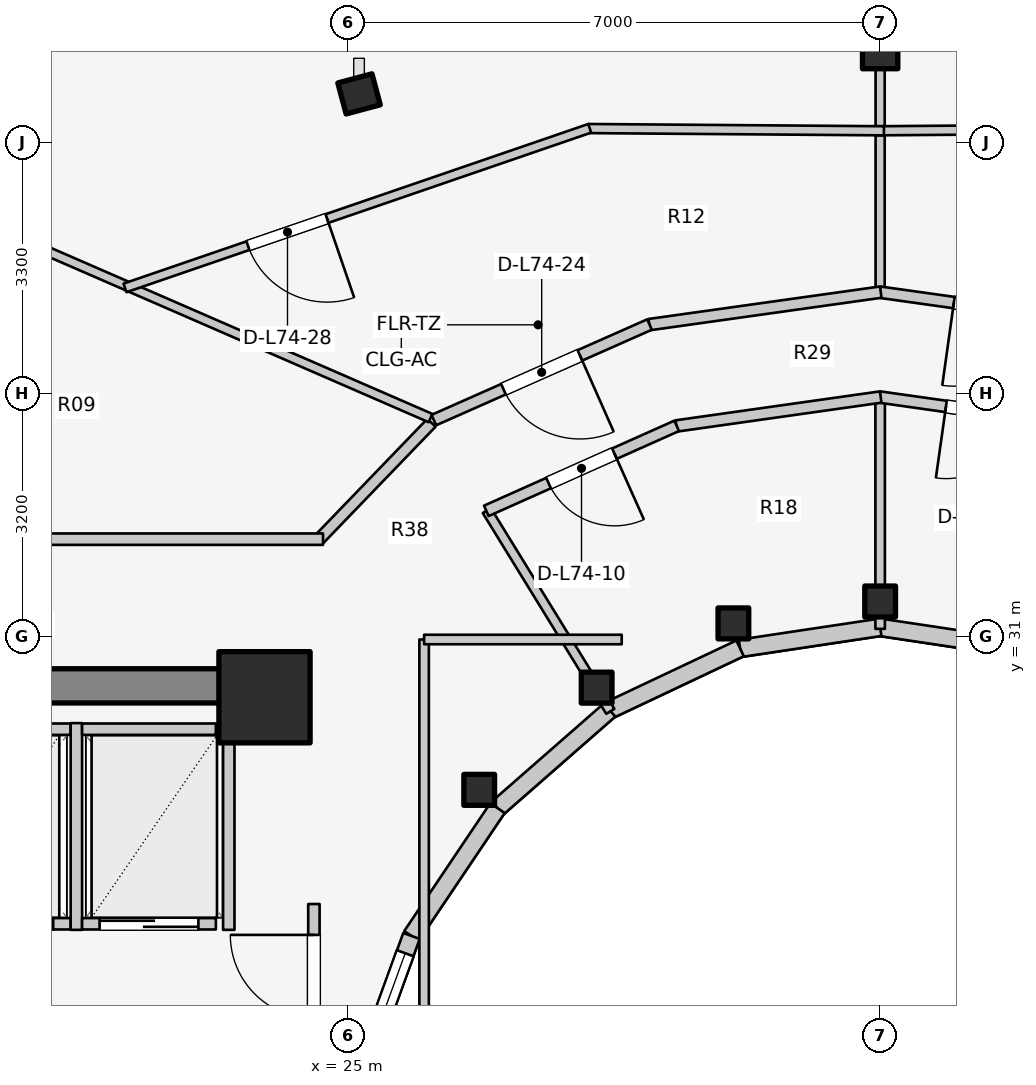
"""IFC4 building model, lengths in metres.
Left out: names, types, materials, properties, quantities, classifications, styles, units other than length and angle.
Written with IfcOpenShell. Run it as: python <this file> out.ifc"""

import sys

from ifc_helpers import new_model, si_unit, direction, frame, frame_2d, origin, origin_2d, place, context, subcontext, project, spatial, rectangle, i_section, extrude, element, fill, save


model = new_model("IFC4")
c1 = context("Model", 3, precision=1e-05, world=origin(), true_north=direction((0.0, 1.0)))
c2 = subcontext(c1, "Body", "Model", "MODEL_VIEW")
j1 = project(units=[si_unit("LENGTHUNIT", "METRE"), si_unit("PLANEANGLEUNIT", "RADIAN")], contexts=[c1])
p1 = place(None, origin())
s1 = spatial("IfcSite", under=j1, at=p1, CompositionType="ELEMENT")
p2 = place(p1, origin())
s2 = spatial("IfcBuilding", under=s1, at=p2, CompositionType="ELEMENT")
p3 = place(p2, frame((0.0, 0.0, 242.4)))
s3 = spatial("IfcBuildingStorey", under=s2, at=p3, CompositionType="ELEMENT", Elevation=242.4)
p4 = place(p3, frame((19.65, 30.35, 0.0), z_axis=(0.0, 0.0, 1.0), x_axis=(1.0, 0.0, 0.0)))
e1 = element("IfcWall", 1, at=p4, inside=s3, PredefinedType="SHEAR", context=c2, shape_type="SweptSolid", body=[
    extrude(rectangle(XDim=4.5, YDim=0.45, at=frame_2d((2.25, 0.0))), origin(), (0.0, 0.0, 1.0), 3.6),
])
p5 = place(p3, frame((23.9, 30.2, 0.0), z_axis=(0.0, 0.0, 1.0), x_axis=(1.0, 0.0, 0.0)))
e2 = element("IfcColumn", 2, at=p5, inside=s3, PredefinedType="COLUMN", context=c2, shape_type="SweptSolid", body=[
    extrude(rectangle(XDim=1.2, YDim=1.2, at=origin_2d()), origin(), (0.0, 0.0, 1.0), 3.6),
])
p6 = place(p3, frame((32.0, 31.46, 0.0), z_axis=(0.0, 0.0, 1.0), x_axis=(1.0, 0.0, 0.0)))
e3 = element("IfcColumn", 3, at=p6, inside=s3, PredefinedType="COLUMN", context=c2, shape_type="SweptSolid", body=[
    extrude(i_section(OverallWidth=0.404, OverallDepth=0.407, WebThickness=0.027, FlangeThickness=0.044, FilletRadius=0.025, at=origin_2d()), origin(), (0.0, 0.0, 1.0), 3.6),
])
p7 = place(p3, frame((32.0, 38.68, 0.0), z_axis=(0.0, 0.0, 1.0), x_axis=(0.0, 1.0, 0.0)))
e4 = element("IfcColumn", 4, at=p7, inside=s3, PredefinedType="COLUMN", context=c2, shape_type="SweptSolid", body=[
    extrude(i_section(OverallWidth=0.422, OverallDepth=0.465, WebThickness=0.045, FlangeThickness=0.073, FilletRadius=0.025, at=origin_2d()), origin(), (0.0, 0.0, 1.0), 3.6),
])
p8 = place(p3, frame((30.069, 31.172, 0.0), z_axis=(0.0, 0.0, 1.0), x_axis=(1.0, 0.0, 0.0)))
e5 = element("IfcColumn", 5, at=p8, inside=s3, PredefinedType="COLUMN", context=c2, shape_type="SweptSolid", body=[
    extrude(i_section(OverallWidth=0.404, OverallDepth=0.407, WebThickness=0.027, FlangeThickness=0.044, FilletRadius=0.025, at=origin_2d()), origin(), (0.0, 0.0, 1.0), 3.6),
])
p9 = place(p3, frame((25.144, 38.138, 0.0), z_axis=(0.0, 0.0, 1.0), x_axis=(-0.258819045103, 0.965925826289, 0.0)))
e6 = element("IfcColumn", 6, at=p9, inside=s3, PredefinedType="COLUMN", context=c2, shape_type="SweptSolid", body=[
    extrude(i_section(OverallWidth=0.422, OverallDepth=0.465, WebThickness=0.045, FlangeThickness=0.073, FilletRadius=0.025, at=origin_2d()), origin(), (0.0, 0.0, 1.0), 3.6),
])
for number, where, z_axis, x_axis in (
    (7, (28.27, 30.327, 0.0), (0.0, 0.0, 1.0), (1.0, 0.0, 0.0)),
    (8, (26.725, 28.982, 0.0), (0.0, 0.0, 1.0), (1.0, 0.0, 0.0)),
):
    element("IfcColumn", number, at=place(p3, frame(where, z_axis=z_axis, x_axis=x_axis)), inside=s3, PredefinedType="COLUMN", context=c2, shape_type="SweptSolid", body=[
        extrude(i_section(OverallWidth=0.404, OverallDepth=0.407, WebThickness=0.027, FlangeThickness=0.044, FilletRadius=0.025, at=origin_2d()), origin(), (0.0, 0.0, 1.0), 3.6),
    ])
for number, where, z_axis, x_axis in (
    (9, (33.843, 30.843, 0.0), (0.0, 0.0, 1.0), (-0.989, 0.149, 0.0)),
    (10, (32.0, 31.12, 0.0), (0.0, 0.0, 1.0), (-0.989, -0.149, 0.0)),
):
    element("IfcWall", number, at=place(p3, frame(where, z_axis=z_axis, x_axis=x_axis)), inside=s3, PredefinedType="STANDARD", context=c2, shape_type="SweptSolid", body=[
        extrude(rectangle(XDim=1.864, YDim=0.23, at=frame_2d((0.932, 0.0))), origin(), (0.0, 0.0, 1.0), 2.6),
    ])
p10 = place(p3, frame((30.157, 30.843, 0.0), z_axis=(0.0, 0.0, 1.0), x_axis=(-0.904179699603, -0.427152280606, 0.0)))
e11 = element("IfcWall", 11, at=p10, inside=s3, PredefinedType="STANDARD", context=c2, shape_type="SweptSolid", body=[
    extrude(rectangle(XDim=1.899, YDim=0.23, at=frame_2d((0.95, 0.0))), origin(), (0.0, 0.0, 1.0), 2.6),
])
p11 = place(p3, frame((28.44, 30.032, 0.0), z_axis=(0.0, 0.0, 1.0), x_axis=(-0.752576694707, -0.658504607869, 0.0)))
e12 = element("IfcWall", 12, at=p11, inside=s3, PredefinedType="STANDARD", context=c2, shape_type="SweptSolid", body=[
    extrude(rectangle(XDim=1.959, YDim=0.23, at=frame_2d((0.98, 0.0))), origin(), (0.0, 0.0, 1.0), 2.6),
])
p12 = place(p3, frame((26.965, 28.742, 0.0), z_axis=(0.0, 0.0, 1.0), x_axis=(-0.558197800898, -0.829707909492, 0.0)))
e13 = element("IfcWall", 13, at=p12, inside=s3, PredefinedType="STANDARD", context=c2, shape_type="SweptSolid", body=[
    extrude(rectangle(XDim=2.027, YDim=0.23, at=frame_2d((1.013, 0.0))), origin(), (0.0, 0.0, 1.0), 2.6),
])
p13 = place(p3, frame((25.834, 27.06, 0.0), z_axis=(0.0, 0.0, 1.0), x_axis=(-0.341423187295, -0.93990968033, 0.0)))
e14 = element("IfcWall", 14, at=p13, inside=s3, PredefinedType="STANDARD", context=c2, shape_type="SweptSolid", body=[
    extrude(rectangle(XDim=2.084, YDim=0.23, at=frame_2d((1.042, 0.0))), origin(), (0.0, 0.0, 1.0), 3.28),
])
p14 = place(p13, frame((0.242, 0.0, 0.85)))
e15 = element("IfcOpeningElement", 15, at=p14, cuts=e14, PredefinedType="OPENING", context=c2, shape_type="SweptSolid", body=[
    extrude(rectangle(XDim=1.6, YDim=1.65, at=frame_2d((0.8, 0.825))), frame((0.0, 0.125, 0.0), z_axis=(0.0, -1.0, 0.0), x_axis=(1.0, 0.0, 0.0)), (0.0, 0.0, 1.0), 0.25),
])
p15 = place(p3, frame((19.59, 27.22, 0.0), z_axis=(0.0, 0.0, 1.0), x_axis=(1.0, 0.0, 0.0)))
e16 = element("IfcWall", 16, at=p15, inside=s3, PredefinedType="SOLIDWALL", context=c2, shape_type="SweptSolid", body=[
    extrude(rectangle(XDim=1.76, YDim=0.15, at=frame_2d((0.88, 0.0))), origin(), (0.0, 0.0, 1.0), 3.295),
])
p16 = place(p15, frame((0.23, 0.0, 0.0)))
e17 = element("IfcOpeningElement", 17, at=p16, cuts=e16, PredefinedType="OPENING", context=c2, shape_type="SweptSolid", body=[
    extrude(rectangle(XDim=1.3, YDim=2.1, at=frame_2d((0.65, 1.05))), frame((0.0, 0.085, 0.0), z_axis=(0.0, -1.0, 0.0), x_axis=(1.0, 0.0, 0.0)), (0.0, 0.0, 1.0), 0.17),
])
p17 = place(p3, frame((19.59, 29.78, 0.0), z_axis=(0.0, 0.0, 1.0), x_axis=(1.0, 0.0, 0.0)))
e18 = element("IfcWall", 18, at=p17, inside=s3, PredefinedType="SOLIDWALL", context=c2, shape_type="SweptSolid", body=[
    extrude(rectangle(XDim=1.76, YDim=0.15, at=frame_2d((0.88, 0.0))), origin(), (0.0, 0.0, 1.0), 3.295),
])
p18 = place(p3, frame((21.425, 27.14, 0.0), z_axis=(0.0, 0.0, 1.0), x_axis=(0.0, 1.0, 0.0)))
e19 = element("IfcWall", 19, at=p18, inside=s3, PredefinedType="SOLIDWALL", context=c2, shape_type="SweptSolid", body=[
    extrude(rectangle(XDim=2.72, YDim=0.15, at=frame_2d((1.36, 0.0))), origin(), (0.0, 0.0, 1.0), 3.295),
])
p19 = place(p3, frame((21.5, 27.22, 0.0), z_axis=(0.0, 0.0, 1.0), x_axis=(1.0, 0.0, 0.0)))
e20 = element("IfcWall", 20, at=p19, inside=s3, PredefinedType="SOLIDWALL", context=c2, shape_type="SweptSolid", body=[
    extrude(rectangle(XDim=1.76, YDim=0.15, at=frame_2d((0.88, 0.0))), origin(), (0.0, 0.0, 1.0), 3.295),
])
p20 = place(p19, frame((0.23, 0.0, 0.0)))
e21 = element("IfcOpeningElement", 21, at=p20, cuts=e20, PredefinedType="OPENING", context=c2, shape_type="SweptSolid", body=[
    extrude(rectangle(XDim=1.3, YDim=2.1, at=frame_2d((0.65, 1.05))), frame((0.0, 0.085, 0.0), z_axis=(0.0, -1.0, 0.0), x_axis=(1.0, 0.0, 0.0)), (0.0, 0.0, 1.0), 0.17),
])
p21 = place(p3, frame((21.5, 29.78, 0.0), z_axis=(0.0, 0.0, 1.0), x_axis=(1.0, 0.0, 0.0)))
e22 = element("IfcWall", 22, at=p21, inside=s3, PredefinedType="SOLIDWALL", context=c2, shape_type="SweptSolid", body=[
    extrude(rectangle(XDim=1.76, YDim=0.15, at=frame_2d((0.88, 0.0))), origin(), (0.0, 0.0, 1.0), 3.295),
])
p22 = place(p3, frame((23.43, 27.14, 0.0), z_axis=(0.0, 0.0, 1.0), x_axis=(0.0, 1.0, 0.0)))
e23 = element("IfcWall", 23, at=p22, inside=s3, PredefinedType="SOLIDWALL", context=c2, shape_type="SweptSolid", body=[
    extrude(rectangle(XDim=2.72, YDim=0.15, at=frame_2d((1.36, 0.0))), origin(), (0.0, 0.0, 1.0), 3.295),
])
p23 = place(p3, frame((24.55, 24.08, 0.0), z_axis=(0.0, 0.0, 1.0), x_axis=(0.0, 1.0, 0.0)))
e24 = element("IfcWall", 24, at=p23, inside=s3, PredefinedType="PARTITIONING", context=c2, shape_type="SweptSolid", body=[
    extrude(rectangle(XDim=3.4, YDim=0.15, at=frame_2d((1.7, 0.0))), origin(), (0.0, 0.0, 1.0), 3.295),
])
p24 = place(p23, frame((1.894, 0.0, 0.0)))
e25 = element("IfcOpeningElement", 25, at=p24, cuts=e24, PredefinedType="OPENING", context=c2, shape_type="SweptSolid", body=[
    extrude(rectangle(XDim=1.1, YDim=2.1, at=frame_2d((0.55, 1.05))), frame((0.0, 0.085, 0.0), z_axis=(0.0, -1.0, 0.0), x_axis=(1.0, 0.0, 0.0)), (0.0, 0.0, 1.0), 0.17),
])
p25 = place(p3, frame((32.0, 31.1, 0.0), z_axis=(0.0, 0.0, 1.0), x_axis=(0.0, 1.0, 0.0)))
e26 = element("IfcWall", 26, at=p25, inside=s3, PredefinedType="PARTITIONING", context=c2, shape_type="SweptSolid", body=[
    extrude(rectangle(XDim=3.05, YDim=0.125, at=frame_2d((1.525, 0.0))), origin(), (0.0, 0.0, 1.0), 2.672),
])
p26 = place(p3, frame((28.45, 30.015, 0.0), z_axis=(0.0, 0.0, 1.0), x_axis=(-0.523992004803, 0.851723182086, 0.0)))
e27 = element("IfcWall", 27, at=p26, inside=s3, PredefinedType="PARTITIONING", context=c2, shape_type="SweptSolid", body=[
    extrude(rectangle(XDim=3.101, YDim=0.125, at=frame_2d((1.551, 0.0))), origin(), (0.0, 0.0, 1.0), 2.672),
])
p27 = place(p3, frame((34.68, 33.77, 0.0), z_axis=(0.0, 0.0, 1.0), x_axis=(-0.990132151456, 0.140136799779, 0.0)))
e28 = element("IfcWall", 28, at=p27, inside=s3, PredefinedType="PARTITIONING", context=c2, shape_type="SweptSolid", body=[
    extrude(rectangle(XDim=2.714, YDim=0.15, at=frame_2d((1.357, 0.0))), origin(), (0.0, 0.0, 1.0), 2.823),
])
p28 = place(p27, frame((0.882, 0.0, 0.0)))
e29 = element("IfcOpeningElement", 29, at=p28, cuts=e28, PredefinedType="OPENING", context=c2, shape_type="SweptSolid", body=[
    extrude(rectangle(XDim=0.95, YDim=2.1, at=frame_2d((0.475, 1.05))), frame((0.0, 0.085, 0.0), z_axis=(0.0, -1.0, 0.0), x_axis=(1.0, 0.0, 0.0)), (0.0, 0.0, 1.0), 0.17),
])
p29 = place(p3, frame((32.007, 34.15, 0.0), z_axis=(0.0, 0.0, 1.0), x_axis=(-0.990132151456, -0.140136799779, 0.0)))
e30 = element("IfcWall", 30, at=p29, inside=s3, PredefinedType="PARTITIONING", context=c2, shape_type="SweptSolid", body=[
    extrude(rectangle(XDim=2.714, YDim=0.15, at=frame_2d((1.357, 0.0))), origin(), (0.0, 0.0, 1.0), 2.823),
])
p30 = place(p3, frame((29.323, 33.771, 0.0), z_axis=(0.0, 0.0, 1.0), x_axis=(-0.913120130558, -0.407690602257, 0.0)))
e31 = element("IfcWall", 31, at=p30, inside=s3, PredefinedType="PARTITIONING", context=c2, shape_type="SweptSolid", body=[
    extrude(rectangle(XDim=2.743, YDim=0.15, at=frame_2d((1.371, 0.0))), origin(), (0.0, 0.0, 1.0), 2.823),
])
p31 = place(p30, frame((0.896, 0.0, 0.0)))
e32 = element("IfcOpeningElement", 32, at=p31, cuts=e31, PredefinedType="OPENING", context=c2, shape_type="SweptSolid", body=[
    extrude(rectangle(XDim=0.95, YDim=2.1, at=frame_2d((0.475, 1.05))), frame((0.0, 0.085, 0.0), z_axis=(0.0, -1.0, 0.0), x_axis=(1.0, 0.0, 0.0)), (0.0, 0.0, 1.0), 0.17),
])
p32 = place(p3, frame((26.0, 25.8, 0.0), z_axis=(0.0, 0.0, 1.0), x_axis=(0.0, 1.0, 0.0)))
e33 = element("IfcWall", 33, at=p32, inside=s3, PredefinedType="PARTITIONING", context=c2, shape_type="SweptSolid", body=[
    extrude(rectangle(XDim=5.16, YDim=0.125, at=frame_2d((2.58, 0.0))), origin(), (0.0, 0.0, 1.0), 2.672),
])
p33 = place(p3, frame((26.0, 30.96, 0.0), z_axis=(0.0, 0.0, 1.0), x_axis=(1.0, 0.0, 0.0)))
e34 = element("IfcWall", 34, at=p33, inside=s3, PredefinedType="PARTITIONING", context=c2, shape_type="SweptSolid", body=[
    extrude(rectangle(XDim=2.6, YDim=0.125, at=frame_2d((1.3, 0.0))), origin(), (0.0, 0.0, 1.0), 2.816),
])
p34 = place(p3, frame((26.097, 33.812, 0.0), z_axis=(0.0, 0.0, 1.0), x_axis=(-0.694032962553, -0.719943224768, 0.0)))
e35 = element("IfcWall", 35, at=p34, inside=s3, PredefinedType="PARTITIONING", context=c2, shape_type="SweptSolid", body=[
    extrude(rectangle(XDim=2.158, YDim=0.15, at=frame_2d((1.079, 0.0))), origin(), (0.0, 0.0, 1.0), 2.816),
])
p35 = place(p3, frame((17.15, 32.28, 0.0), z_axis=(0.0, 0.0, 1.0), x_axis=(1.0, 0.0, 0.0)))
e36 = element("IfcWall", 36, at=p35, inside=s3, PredefinedType="PARTITIONING", context=c2, shape_type="SweptSolid", body=[
    extrude(rectangle(XDim=7.52, YDim=0.15, at=frame_2d((3.76, 0.0))), origin(), (0.0, 0.0, 1.0), 2.816),
])
p36 = place(p35, frame((1.3, 0.0, 0.0)))
e37 = element("IfcOpeningElement", 37, at=p36, cuts=e36, PredefinedType="OPENING", context=c2, shape_type="SweptSolid", body=[
    extrude(rectangle(XDim=0.9, YDim=2.1, at=frame_2d((0.45, 1.05))), frame((0.0, 0.085, 0.0), z_axis=(0.0, -1.0, 0.0), x_axis=(1.0, 0.0, 0.0)), (0.0, 0.0, 1.0), 0.17),
])
p37 = place(p3, frame((32.0, 35.585, 0.0), z_axis=(0.0, 0.0, 1.0), x_axis=(0.0, 1.0, 0.0)))
e38 = element("IfcWall", 38, at=p37, inside=s3, PredefinedType="MOVABLE", context=c2, shape_type="SweptSolid", body=[
    extrude(rectangle(XDim=2.895, YDim=0.12, at=frame_2d((1.448, 0.0))), origin(), (0.0, 0.0, 1.0), 2.66),
])
p38 = place(p3, frame((26.085, 33.873, 0.0), z_axis=(0.0, 0.0, 1.0), x_axis=(-0.916946661839, 0.399009798554, 0.0)))
e39 = element("IfcWall", 39, at=p38, inside=s3, PredefinedType="MOVABLE", context=c2, shape_type="SweptSolid", body=[
    extrude(rectangle(XDim=6.042, YDim=0.12, at=frame_2d((3.021, 0.0))), origin(), (0.0, 0.0, 1.0), 2.66),
])
p39 = place(p3, frame((35.038, 35.103, 0.0), z_axis=(0.0, 0.0, 1.0), x_axis=(-0.990295701983, 0.138976338396, 0.0)))
e40 = element("IfcWall", 40, at=p39, inside=s3, PredefinedType="PARTITIONING", context=c2, shape_type="SweptSolid", body=[
    extrude(rectangle(XDim=3.076, YDim=0.15, at=frame_2d((1.538, 0.0))), origin(), (0.0, 0.0, 1.0), 2.823),
])
p40 = place(p39, frame((0.988, 0.0, 0.0)))
e41 = element("IfcOpeningElement", 41, at=p40, cuts=e40, PredefinedType="OPENING", context=c2, shape_type="SweptSolid", body=[
    extrude(rectangle(XDim=1.1, YDim=2.1, at=frame_2d((0.55, 1.05))), frame((0.0, 0.085, 0.0), z_axis=(0.0, -1.0, 0.0), x_axis=(1.0, 0.0, 0.0)), (0.0, 0.0, 1.0), 0.17),
])
p41 = place(p3, frame((32.008, 35.53, 0.0), z_axis=(0.0, 0.0, 1.0), x_axis=(-0.990295701983, -0.138976338396, 0.0)))
e42 = element("IfcWall", 42, at=p41, inside=s3, PredefinedType="PARTITIONING", context=c2, shape_type="SweptSolid", body=[
    extrude(rectangle(XDim=3.076, YDim=0.15, at=frame_2d((1.538, 0.0))), origin(), (0.0, 0.0, 1.0), 2.823),
])
p42 = place(p3, frame((28.966, 35.104, 0.0), z_axis=(0.0, 0.0, 1.0), x_axis=(-0.914384748819, -0.404846305563, 0.0)))
e43 = element("IfcWall", 43, at=p42, inside=s3, PredefinedType="PARTITIONING", context=c2, shape_type="SweptSolid", body=[
    extrude(rectangle(XDim=3.104, YDim=0.15, at=frame_2d((1.552, 0.0))), origin(), (0.0, 0.0, 1.0), 2.823),
])
p43 = place(p42, frame((1.002, 0.0, 0.0)))
e44 = element("IfcOpeningElement", 44, at=p43, cuts=e43, PredefinedType="OPENING", context=c2, shape_type="SweptSolid", body=[
    extrude(rectangle(XDim=1.1, YDim=2.1, at=frame_2d((0.55, 1.05))), frame((0.0, 0.085, 0.0), z_axis=(0.0, -1.0, 0.0), x_axis=(1.0, 0.0, 0.0)), (0.0, 0.0, 1.0), 0.17),
])
p44 = place(p3, frame((35.841, 37.682, 0.0), z_axis=(0.0, 0.0, 1.0), x_axis=(-0.999971175398, -0.007592652624, 0.0)))
e45 = element("IfcWall", 45, at=p44, inside=s3, PredefinedType="MOVABLE", context=c2, shape_type="SweptSolid", body=[
    extrude(rectangle(XDim=3.891, YDim=0.12, at=frame_2d((1.945, 0.0))), origin(), (0.0, 0.0, 1.0), 2.823),
])
p45 = place(p44, frame((1.395, 0.0, 0.0)))
e46 = element("IfcOpeningElement", 46, at=p45, cuts=e45, PredefinedType="OPENING", context=c2, shape_type="SweptSolid", body=[
    extrude(rectangle(XDim=1.1, YDim=2.1, at=frame_2d((0.55, 1.05))), frame((0.0, 0.07, 0.0), z_axis=(0.0, -1.0, 0.0), x_axis=(1.0, 0.0, 0.0)), (0.0, 0.0, 1.0), 0.14),
])
p46 = place(p3, frame((32.05, 37.653, 0.0), z_axis=(0.0, 0.0, 1.0), x_axis=(-0.999971175398, 0.007592652624, 0.0)))
e47 = element("IfcWall", 47, at=p46, inside=s3, PredefinedType="MOVABLE", context=c2, shape_type="SweptSolid", body=[
    extrude(rectangle(XDim=3.891, YDim=0.12, at=frame_2d((1.945, 0.0))), origin(), (0.0, 0.0, 1.0), 2.823),
])
p47 = place(p3, frame((28.179, 37.685, 0.0), z_axis=(0.0, 0.0, 1.0), x_axis=(-0.945789589552, -0.324780005995, 0.0)))
e48 = element("IfcWall", 48, at=p47, inside=s3, PredefinedType="MOVABLE", context=c2, shape_type="SweptSolid", body=[
    extrude(rectangle(XDim=6.465, YDim=0.12, at=frame_2d((3.232, 0.0))), origin(), (0.0, 0.0, 1.0), 2.823),
])
p48 = place(p47, frame((3.654, 0.0, 0.0)))
e49 = element("IfcOpeningElement", 49, at=p48, cuts=e48, PredefinedType="OPENING", context=c2, shape_type="SweptSolid", body=[
    extrude(rectangle(XDim=1.1, YDim=2.1, at=frame_2d((0.55, 1.05))), frame((0.0, 0.07, 0.0), z_axis=(0.0, -1.0, 0.0), x_axis=(1.0, 0.0, 0.0)), (0.0, 0.0, 1.0), 0.14),
])
p49 = place(p14, origin())
e50 = element("IfcWindow", 50, at=p49, inside=s3, PartitioningType="SINGLE_PANEL", PredefinedType="WINDOW", context=c2, shape_type="SweptSolid", body=[
    extrude(rectangle(XDim=1.6, YDim=1.65, at=frame_2d((0.8, 0.825))), frame((0.0, 0.03, 0.0), z_axis=(0.0, -1.0, 0.0), x_axis=(1.0, 0.0, 0.0)), (0.0, 0.0, 1.0), 0.06),
])
fill(e15, e50)
p50 = place(p16, origin())
e51 = element("IfcDoor", 51, at=p50, inside=s3, OperationType="DOUBLE_DOOR_SLIDING", PredefinedType="DOOR", context=c2, shape_type="SweptSolid", body=[
    extrude(rectangle(XDim=1.3, YDim=2.1, at=frame_2d((0.65, 1.05))), frame((0.0, 0.025, 0.0), z_axis=(0.0, -1.0, 0.0), x_axis=(1.0, 0.0, 0.0)), (0.0, 0.0, 1.0), 0.05),
])
fill(e17, e51)
p51 = place(p20, origin())
e52 = element("IfcDoor", 52, at=p51, inside=s3, OperationType="DOUBLE_DOOR_SLIDING", PredefinedType="DOOR", context=c2, shape_type="SweptSolid", body=[
    extrude(rectangle(XDim=1.3, YDim=2.1, at=frame_2d((0.65, 1.05))), frame((0.0, 0.025, 0.0), z_axis=(0.0, -1.0, 0.0), x_axis=(1.0, 0.0, 0.0)), (0.0, 0.0, 1.0), 0.05),
])
fill(e21, e52)
p52 = place(p24, origin())
e53 = element("IfcDoor", 53, at=p52, inside=s3, OperationType="SINGLE_SWING_RIGHT", PredefinedType="DOOR", context=c2, shape_type="SweptSolid", body=[
    extrude(rectangle(XDim=1.1, YDim=2.1, at=frame_2d((0.55, 1.05))), frame((0.0, 0.025, 0.0), z_axis=(0.0, -1.0, 0.0), x_axis=(1.0, 0.0, 0.0)), (0.0, 0.0, 1.0), 0.05),
])
fill(e25, e53)
p53 = place(p28, origin())
e54 = element("IfcDoor", 54, at=p53, inside=s3, OperationType="SINGLE_SWING_RIGHT", PredefinedType="DOOR", context=c2, shape_type="SweptSolid", body=[
    extrude(rectangle(XDim=0.95, YDim=2.1, at=frame_2d((0.475, 1.05))), frame((0.0, 0.025, 0.0), z_axis=(0.0, -1.0, 0.0), x_axis=(1.0, 0.0, 0.0)), (0.0, 0.0, 1.0), 0.05),
])
fill(e29, e54)
p54 = place(p31, origin())
e55 = element("IfcDoor", 55, at=p54, inside=s3, OperationType="SINGLE_SWING_LEFT", PredefinedType="DOOR", context=c2, shape_type="SweptSolid", body=[
    extrude(rectangle(XDim=0.95, YDim=2.1, at=frame_2d((0.475, 1.05))), frame((0.0, 0.025, 0.0), z_axis=(0.0, -1.0, 0.0), x_axis=(1.0, 0.0, 0.0)), (0.0, 0.0, 1.0), 0.05),
])
fill(e32, e55)
p55 = place(p40, origin())
e56 = element("IfcDoor", 56, at=p55, inside=s3, OperationType="SINGLE_SWING_RIGHT", PredefinedType="DOOR", context=c2, shape_type="SweptSolid", body=[
    extrude(rectangle(XDim=1.1, YDim=2.1, at=frame_2d((0.55, 1.05))), frame((0.0, 0.025, 0.0), z_axis=(0.0, -1.0, 0.0), x_axis=(1.0, 0.0, 0.0)), (0.0, 0.0, 1.0), 0.05),
])
fill(e41, e56)
p56 = place(p43, origin())
e57 = element("IfcDoor", 57, at=p56, inside=s3, OperationType="SINGLE_SWING_LEFT", PredefinedType="DOOR", context=c2, shape_type="SweptSolid", body=[
    extrude(rectangle(XDim=1.1, YDim=2.1, at=frame_2d((0.55, 1.05))), frame((0.0, 0.025, 0.0), z_axis=(0.0, -1.0, 0.0), x_axis=(1.0, 0.0, 0.0)), (0.0, 0.0, 1.0), 0.05),
])
fill(e44, e57)
p57 = place(p48, origin())
e58 = element("IfcDoor", 58, at=p57, inside=s3, OperationType="SINGLE_SWING_LEFT", PredefinedType="DOOR", context=c2, shape_type="SweptSolid", body=[
    extrude(rectangle(XDim=1.1, YDim=2.1, at=frame_2d((0.55, 1.05))), frame((0.0, 0.025, 0.0), z_axis=(0.0, -1.0, 0.0), x_axis=(1.0, 0.0, 0.0)), (0.0, 0.0, 1.0), 0.05),
])
fill(e49, e58)
save(model, sys.argv[1])
